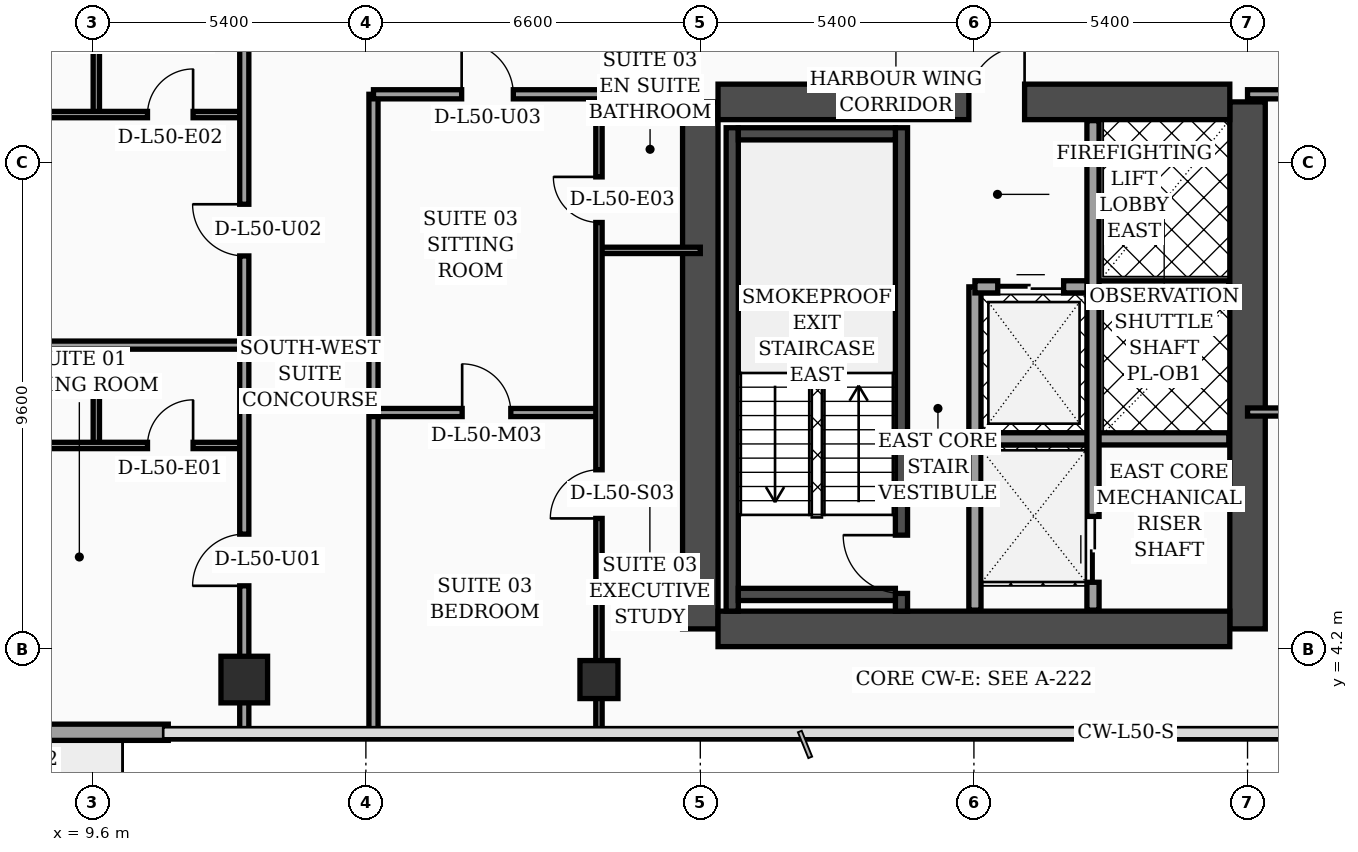
"""IFC4 building model, lengths in metres.
Left out: names, types, materials, properties, quantities, classifications, styles, units other than length and angle.
Written with IfcOpenShell. Run it as: python <this file> out.ifc"""

import sys

from ifc_helpers import new_model, si_unit, direction, frame, frame_2d, origin, origin_2d, place, context, subcontext, project, spatial, rectangle, hollow_rectangle, extrude, element, fill, save


model = new_model("IFC4")
c1 = context("Model", 3, precision=1e-05, world=origin(), true_north=direction((0.0, 1.0)))
c2 = subcontext(c1, "Body", "Model", "MODEL_VIEW")
j1 = project(units=[si_unit("LENGTHUNIT", "METRE"), si_unit("PLANEANGLEUNIT", "RADIAN")], contexts=[c1])
p1 = place(None, origin())
s1 = spatial("IfcSite", under=j1, at=p1, CompositionType="ELEMENT")
p2 = place(p1, origin())
s2 = spatial("IfcBuilding", under=s1, at=p2, CompositionType="ELEMENT")
p3 = place(p2, frame((0.0, 0.0, 203.4)))
s3 = spatial("IfcBuildingStorey", under=s2, at=p3, CompositionType="ELEMENT", Elevation=203.4)
for number, where, z_axis, x_axis in (
    (1, (21.6, 4.6, 0.0), (0.0, 0.0, 1.0), (0.0, 1.0, 0.0)),
    (2, (32.4, 4.6, 0.0), (0.0, 0.0, 1.0), (0.0, 1.0, 0.0)),
):
    element("IfcWall", number, at=place(p3, frame(where, z_axis=z_axis, x_axis=x_axis)), inside=s3, PredefinedType="SHEAR", context=c2, shape_type="SweptSolid", body=[
        extrude(rectangle(XDim=10.4, YDim=0.7, at=frame_2d((5.2, 0.0))), origin(), (0.0, 0.0, 1.0), 3.56),
    ])
p4 = place(p3, frame((21.95, 15.0, 0.0), z_axis=(0.0, 0.0, 1.0), x_axis=(1.0, 0.0, 0.0)))
e3 = element("IfcWall", 3, at=p4, inside=s3, PredefinedType="SHEAR", context=c2, shape_type="SweptSolid", body=[
    extrude(rectangle(XDim=10.1, YDim=0.7, at=frame_2d((5.05, 0.0))), origin(), (0.0, 0.0, 1.0), 3.56),
])
p5 = place(p4, frame((4.95, 0.0, 0.0)))
e4 = element("IfcOpeningElement", 4, at=p5, cuts=e3, PredefinedType="OPENING", context=c2, shape_type="SweptSolid", body=[
    extrude(rectangle(XDim=1.1, YDim=2.2, at=frame_2d((0.55, 1.1))), frame((0.0, 0.36, 0.0), z_axis=(0.0, -1.0, 0.0), x_axis=(1.0, 0.0, 0.0)), (0.0, 0.0, 1.0), 0.72),
])
p6 = place(p3, frame((21.95, 4.6, 0.0), z_axis=(0.0, 0.0, 1.0), x_axis=(1.0, 0.0, 0.0)))
e5 = element("IfcWall", 5, at=p6, inside=s3, PredefinedType="SHEAR", context=c2, shape_type="SweptSolid", body=[
    extrude(rectangle(XDim=10.1, YDim=0.7, at=frame_2d((5.05, 0.0))), origin(), (0.0, 0.0, 1.0), 3.56),
])
p7 = place(p3, frame((22.23, 4.95, 0.0), z_axis=(0.0, 0.0, 1.0), x_axis=(0.0, 1.0, 0.0)))
e6 = element("IfcWall", 6, at=p7, inside=s3, PredefinedType="SOLIDWALL", context=c2, shape_type="SweptSolid", body=[
    extrude(rectangle(XDim=9.54, YDim=0.24, at=frame_2d((4.77, 0.0))), origin(), (0.0, 0.0, 1.0), 3.56),
])
p8 = place(p3, frame((25.57, 4.95, 0.0), z_axis=(0.0, 0.0, 1.0), x_axis=(0.0, 1.0, 0.0)))
e7 = element("IfcWall", 7, at=p8, inside=s3, PredefinedType="SOLIDWALL", context=c2, shape_type="SweptSolid", body=[
    extrude(rectangle(XDim=9.54, YDim=0.24, at=frame_2d((4.77, 0.0))), origin(), (0.0, 0.0, 1.0), 3.56),
])
p9 = place(p8, frame((0.35, 0.0, 0.0)))
e8 = element("IfcOpeningElement", 8, at=p9, cuts=e7, PredefinedType="OPENING", context=c2, shape_type="SweptSolid", body=[
    extrude(rectangle(XDim=1.15, YDim=2.2, at=frame_2d((0.575, 1.1))), frame((0.0, 0.13, 0.0), z_axis=(0.0, -1.0, 0.0), x_axis=(1.0, 0.0, 0.0)), (0.0, 0.0, 1.0), 0.26),
])
for number, where, z_axis, x_axis in (
    (9, (22.35, 5.28, 0.0), (0.0, 0.0, 1.0), (1.0, 0.0, 0.0)),
    (10, (22.35, 14.37, 0.0), (0.0, 0.0, 1.0), (1.0, 0.0, 0.0)),
):
    element("IfcWall", number, at=place(p3, frame(where, z_axis=z_axis, x_axis=x_axis)), inside=s3, PredefinedType="SOLIDWALL", context=c2, shape_type="SweptSolid", body=[
        extrude(rectangle(XDim=3.1, YDim=0.24, at=frame_2d((1.55, 0.0))), origin(), (0.0, 0.0, 1.0), 3.56),
    ])
p10 = place(p3, frame((12.6, 3.6, 0.0), z_axis=(0.0, 0.0, 1.0), x_axis=(1.0, 0.0, 0.0)))
e11 = element("IfcColumn", 11, at=p10, inside=s3, PredefinedType="COLUMN", context=c2, shape_type="SweptSolid", body=[
    extrude(rectangle(XDim=0.92, YDim=0.92, at=origin_2d()), origin(), (0.0, 0.0, 1.0), 3.56),
])
p11 = place(p3, frame((19.6, 3.6, 0.0), z_axis=(0.0, 0.0, 1.0), x_axis=(1.0, 0.0, 0.0)))
e12 = element("IfcColumn", 12, at=p11, inside=s3, PredefinedType="COLUMN", context=c2, shape_type="SweptSolid", body=[
    extrude(hollow_rectangle(XDim=0.75, YDim=0.75, WallThickness=0.032, at=origin_2d()), origin(), (0.0, 0.0, 1.0), 3.56),
])
p12 = place(p3, frame((3.1, 2.56, 0.0), z_axis=(0.0, 0.0, 1.0), x_axis=(1.0, 0.0, 0.0)))
e13 = element("IfcWall", 13, at=p12, inside=s3, PredefinedType="SOLIDWALL", context=c2, shape_type="SweptSolid", body=[
    extrude(rectangle(XDim=8.0, YDim=0.32, at=frame_2d((4.0, 0.0))), origin(), (0.0, 0.0, 1.0), 3.56),
])
p13 = place(p12, frame((0.45, 0.0, 0.75)))
e14 = element("IfcOpeningElement", 14, at=p13, cuts=e13, PredefinedType="OPENING", context=c2, shape_type="SweptSolid", body=[
    extrude(rectangle(XDim=1.0, YDim=1.6, at=frame_2d((0.5, 0.8))), frame((0.0, 0.17, 0.0), z_axis=(0.0, -1.0, 0.0), x_axis=(1.0, 0.0, 0.0)), (0.0, 0.0, 1.0), 0.34),
])
p14 = place(p12, frame((4.2, 0.0, 0.0)))
e15 = element("IfcOpeningElement", 15, at=p14, cuts=e13, PredefinedType="OPENING", context=c2, shape_type="SweptSolid", body=[
    extrude(rectangle(XDim=1.4, YDim=2.25, at=frame_2d((0.7, 1.125))), frame((0.0, 0.17, 0.0), z_axis=(0.0, -1.0, 0.0), x_axis=(1.0, 0.0, 0.0)), (0.0, 0.0, 1.0), 0.34),
])
p15 = place(p3, frame((27.02, 4.97, 0.0), z_axis=(0.0, 0.0, 1.0), x_axis=(0.0, 1.0, 0.0)))
e16 = element("IfcWall", 16, at=p15, inside=s3, PredefinedType="SOLIDWALL", context=c2, shape_type="SweptSolid", body=[
    extrude(rectangle(XDim=6.38, YDim=0.24, at=frame_2d((3.19, 0.0))), origin(), (0.0, 0.0, 1.0), 3.56),
])
p16 = place(p3, frame((27.02, 11.35, 0.0), z_axis=(0.0, 0.0, 1.0), x_axis=(1.0, 0.0, 0.0)))
e17 = element("IfcWall", 17, at=p16, inside=s3, PredefinedType="SOLIDWALL", context=c2, shape_type="SweptSolid", body=[
    extrude(rectangle(XDim=5.01, YDim=0.24, at=frame_2d((2.505, 0.0))), origin(), (0.0, 0.0, 1.0), 3.56),
])
p17 = place(p16, frame((0.45, 0.0, 0.0)))
e18 = element("IfcOpeningElement", 18, at=p17, cuts=e17, PredefinedType="OPENING", context=c2, shape_type="SweptSolid", body=[
    extrude(rectangle(XDim=1.3, YDim=2.35, at=frame_2d((0.65, 1.175))), frame((0.0, 0.13, 0.0), z_axis=(0.0, -1.0, 0.0), x_axis=(1.0, 0.0, 0.0)), (0.0, 0.0, 1.0), 0.26),
])
p18 = place(p3, frame((27.02, 8.35, 0.0), z_axis=(0.0, 0.0, 1.0), x_axis=(1.0, 0.0, 0.0)))
e19 = element("IfcWall", 19, at=p18, inside=s3, PredefinedType="SOLIDWALL", context=c2, shape_type="SweptSolid", body=[
    extrude(rectangle(XDim=5.01, YDim=0.24, at=frame_2d((2.505, 0.0))), origin(), (0.0, 0.0, 1.0), 3.56),
])
p19 = place(p3, frame((29.35, 4.97, 0.0), z_axis=(0.0, 0.0, 1.0), x_axis=(0.0, 1.0, 0.0)))
e20 = element("IfcWall", 20, at=p19, inside=s3, PredefinedType="SOLIDWALL", context=c2, shape_type="SweptSolid", body=[
    extrude(rectangle(XDim=9.66, YDim=0.24, at=frame_2d((4.83, 0.0))), origin(), (0.0, 0.0, 1.0), 3.56),
])
p20 = place(p19, frame((0.55, 0.0, 0.0)))
e21 = element("IfcOpeningElement", 21, at=p20, cuts=e20, PredefinedType="OPENING", context=c2, shape_type="SweptSolid", body=[
    extrude(rectangle(XDim=1.3, YDim=2.35, at=frame_2d((0.65, 1.175))), frame((0.0, 0.13, 0.0), z_axis=(0.0, -1.0, 0.0), x_axis=(1.0, 0.0, 0.0)), (0.0, 0.0, 1.0), 0.26),
])
p21 = place(p3, frame((9.68, 8.22, 0.0), z_axis=(0.0, 0.0, 1.0), x_axis=(0.0, 1.0, 0.0)))
e22 = element("IfcWall", 22, at=p21, inside=s3, PredefinedType="PARTITIONING", context=c2, shape_type="SweptSolid", body=[
    extrude(rectangle(XDim=1.98, YDim=0.125, at=frame_2d((0.99, 0.0))), origin(), (0.0, 0.0, 1.0), 3.09),
])
p22 = place(p3, frame((3.2, 8.22, 0.0), z_axis=(0.0, 0.0, 1.0), x_axis=(1.0, 0.0, 0.0)))
e23 = element("IfcWall", 23, at=p22, inside=s3, PredefinedType="PARTITIONING", context=c2, shape_type="SweptSolid", body=[
    extrude(rectangle(XDim=9.4, YDim=0.125, at=frame_2d((4.7, 0.0))), origin(), (0.0, 0.0, 1.0), 2.94),
])
p23 = place(p22, frame((3.3, 0.0, 0.0)))
e24 = element("IfcOpeningElement", 24, at=p23, cuts=e23, PredefinedType="OPENING", context=c2, shape_type="SweptSolid", body=[
    extrude(rectangle(XDim=0.96, YDim=2.2, at=frame_2d((0.48, 1.1))), frame((0.0, 0.073, 0.0), z_axis=(0.0, -1.0, 0.0), x_axis=(1.0, 0.0, 0.0)), (0.0, 0.0, 1.0), 0.145),
])
p24 = place(p22, frame((7.49, 0.0, 0.0)))
e25 = element("IfcOpeningElement", 25, at=p24, cuts=e23, PredefinedType="OPENING", context=c2, shape_type="SweptSolid", body=[
    extrude(rectangle(XDim=0.9, YDim=2.15, at=frame_2d((0.45, 1.075))), frame((0.0, 0.073, 0.0), z_axis=(0.0, -1.0, 0.0), x_axis=(1.0, 0.0, 0.0)), (0.0, 0.0, 1.0), 0.145),
])
p25 = place(p3, frame((9.68, 14.75, 0.0), z_axis=(0.0, 0.0, 1.0), x_axis=(0.0, 1.0, 0.0)))
e26 = element("IfcWall", 26, at=p25, inside=s3, PredefinedType="PARTITIONING", context=c2, shape_type="SweptSolid", body=[
    extrude(rectangle(XDim=2.05, YDim=0.125, at=frame_2d((1.025, 0.0))), origin(), (0.0, 0.0, 1.0), 3.56),
])
p26 = place(p3, frame((0.08, 14.75, 0.0), z_axis=(0.0, 0.0, 1.0), x_axis=(1.0, 0.0, 0.0)))
e27 = element("IfcWall", 27, at=p26, inside=s3, PredefinedType="PARTITIONING", context=c2, shape_type="SweptSolid", body=[
    extrude(rectangle(XDim=12.52, YDim=0.125, at=frame_2d((6.26, 0.0))), origin(), (0.0, 0.0, 1.0), 2.94),
])
p27 = place(p26, frame((4.32, 0.0, 0.0)))
e28 = element("IfcOpeningElement", 28, at=p27, cuts=e27, PredefinedType="OPENING", context=c2, shape_type="SweptSolid", body=[
    extrude(rectangle(XDim=0.96, YDim=2.2, at=frame_2d((0.48, 1.1))), frame((0.0, 0.073, 0.0), z_axis=(0.0, -1.0, 0.0), x_axis=(1.0, 0.0, 0.0)), (0.0, 0.0, 1.0), 0.145),
])
p28 = place(p26, frame((10.61, 0.0, 0.0)))
e29 = element("IfcOpeningElement", 29, at=p28, cuts=e27, PredefinedType="OPENING", context=c2, shape_type="SweptSolid", body=[
    extrude(rectangle(XDim=0.9, YDim=2.15, at=frame_2d((0.45, 1.075))), frame((0.0, 0.073, 0.0), z_axis=(0.0, -1.0, 0.0), x_axis=(1.0, 0.0, 0.0)), (0.0, 0.0, 1.0), 0.145),
])
p29 = place(p3, frame((0.08, 10.2, 0.0), z_axis=(0.0, 0.0, 1.0), x_axis=(1.0, 0.0, 0.0)))
e30 = element("IfcWall", 30, at=p29, inside=s3, PredefinedType="PARTITIONING", context=c2, shape_type="SweptSolid", body=[
    extrude(rectangle(XDim=12.52, YDim=0.16, at=frame_2d((6.26, 0.0))), origin(), (0.0, 0.0, 1.0), 2.94),
])
p30 = place(p3, frame((12.6, 2.44, 0.0), z_axis=(0.0, 0.0, 1.0), x_axis=(0.0, 1.0, 0.0)))
e31 = element("IfcWall", 31, at=p30, inside=s3, PredefinedType="PARTITIONING", context=c2, shape_type="SweptSolid", body=[
    extrude(rectangle(XDim=14.36, YDim=0.18, at=frame_2d((7.18, 0.0))), origin(), (0.0, 0.0, 1.0), 2.94),
])
p31 = place(p30, frame((3.01, 0.0, 0.0)))
e32 = element("IfcOpeningElement", 32, at=p31, cuts=e31, PredefinedType="OPENING", context=c2, shape_type="SweptSolid", body=[
    extrude(rectangle(XDim=1.02, YDim=2.2, at=frame_2d((0.51, 1.1))), frame((0.0, 0.1, 0.0), z_axis=(0.0, -1.0, 0.0), x_axis=(1.0, 0.0, 0.0)), (0.0, 0.0, 1.0), 0.2),
])
p32 = place(p30, frame((9.52, 0.0, 0.0)))
e33 = element("IfcOpeningElement", 33, at=p32, cuts=e31, PredefinedType="OPENING", context=c2, shape_type="SweptSolid", body=[
    extrude(rectangle(XDim=1.02, YDim=2.2, at=frame_2d((0.51, 1.1))), frame((0.0, 0.1, 0.0), z_axis=(0.0, -1.0, 0.0), x_axis=(1.0, 0.0, 0.0)), (0.0, 0.0, 1.0), 0.2),
])
p33 = place(p3, frame((15.15, 2.44, 0.0), z_axis=(0.0, 0.0, 1.0), x_axis=(0.0, 1.0, 0.0)))
e34 = element("IfcWall", 34, at=p33, inside=s3, PredefinedType="PARTITIONING", context=c2, shape_type="SweptSolid", body=[
    extrude(rectangle(XDim=12.71, YDim=0.18, at=frame_2d((6.355, 0.0))), origin(), (0.0, 0.0, 1.0), 3.09),
])
p34 = place(p3, frame((19.6, 12.07, 0.0), z_axis=(0.0, 0.0, 1.0), x_axis=(1.0, 0.0, 0.0)))
e35 = element("IfcWall", 35, at=p34, inside=s3, PredefinedType="PARTITIONING", context=c2, shape_type="SweptSolid", body=[
    extrude(rectangle(XDim=2.0, YDim=0.125, at=frame_2d((1.0, 0.0))), origin(), (0.0, 0.0, 1.0), 3.56),
])
p35 = place(p3, frame((15.15, 8.87, 0.0), z_axis=(0.0, 0.0, 1.0), x_axis=(1.0, 0.0, 0.0)))
e36 = element("IfcWall", 36, at=p35, inside=s3, PredefinedType="PARTITIONING", context=c2, shape_type="SweptSolid", body=[
    extrude(rectangle(XDim=4.45, YDim=0.16, at=frame_2d((2.225, 0.0))), origin(), (0.0, 0.0, 1.0), 3.56),
])
p36 = place(p35, frame((1.75, 0.0, 0.0)))
e37 = element("IfcOpeningElement", 37, at=p36, cuts=e36, PredefinedType="OPENING", context=c2, shape_type="SweptSolid", body=[
    extrude(rectangle(XDim=0.96, YDim=2.2, at=frame_2d((0.48, 1.1))), frame((0.0, 0.09, 0.0), z_axis=(0.0, -1.0, 0.0), x_axis=(1.0, 0.0, 0.0)), (0.0, 0.0, 1.0), 0.18),
])
p37 = place(p3, frame((19.6, 2.44, 0.0), z_axis=(0.0, 0.0, 1.0), x_axis=(0.0, 1.0, 0.0)))
e38 = element("IfcWall", 38, at=p37, inside=s3, PredefinedType="PARTITIONING", context=c2, shape_type="SweptSolid", body=[
    extrude(rectangle(XDim=12.71, YDim=0.125, at=frame_2d((6.355, 0.0))), origin(), (0.0, 0.0, 1.0), 2.59),
])
p38 = place(p37, frame((4.34, 0.0, 0.0)))
e39 = element("IfcOpeningElement", 39, at=p38, cuts=e38, PredefinedType="OPENING", context=c2, shape_type="SweptSolid", body=[
    extrude(rectangle(XDim=0.96, YDim=2.2, at=frame_2d((0.48, 1.1))), frame((0.0, 0.073, 0.0), z_axis=(0.0, -1.0, 0.0), x_axis=(1.0, 0.0, 0.0)), (0.0, 0.0, 1.0), 0.145),
])
p39 = place(p37, frame((10.18, 0.0, 0.0)))
e40 = element("IfcOpeningElement", 40, at=p39, cuts=e38, PredefinedType="OPENING", context=c2, shape_type="SweptSolid", body=[
    extrude(rectangle(XDim=0.9, YDim=2.15, at=frame_2d((0.45, 1.075))), frame((0.0, 0.073, 0.0), z_axis=(0.0, -1.0, 0.0), x_axis=(1.0, 0.0, 0.0)), (0.0, 0.0, 1.0), 0.145),
])
p40 = place(p3, frame((15.15, 15.15, 0.0), z_axis=(0.0, 0.0, 1.0), x_axis=(1.0, 0.0, 0.0)))
e41 = element("IfcWall", 41, at=p40, inside=s3, PredefinedType="PARTITIONING", context=c2, shape_type="SweptSolid", body=[
    extrude(rectangle(XDim=6.45, YDim=0.18, at=frame_2d((3.225, 0.0))), origin(), (0.0, 0.0, 1.0), 2.59),
])
p41 = place(p40, frame((1.74, 0.0, 0.0)))
e42 = element("IfcOpeningElement", 42, at=p41, cuts=e41, PredefinedType="OPENING", context=c2, shape_type="SweptSolid", body=[
    extrude(rectangle(XDim=1.02, YDim=2.2, at=frame_2d((0.51, 1.1))), frame((0.0, 0.1, 0.0), z_axis=(0.0, -1.0, 0.0), x_axis=(1.0, 0.0, 0.0)), (0.0, 0.0, 1.0), 0.2),
])
p42 = place(p3, frame((32.4, 8.88, 0.0), z_axis=(0.0, 0.0, 1.0), x_axis=(1.0, 0.0, 0.0)))
e43 = element("IfcWall", 43, at=p42, inside=s3, PredefinedType="PARTITIONING", context=c2, shape_type="SweptSolid", body=[
    extrude(rectangle(XDim=7.02, YDim=0.16, at=frame_2d((3.51, 0.0))), origin(), (0.0, 0.0, 1.0), 2.94),
])
p43 = place(p42, frame((3.03, 0.0, 0.0)))
e44 = element("IfcOpeningElement", 44, at=p43, cuts=e43, PredefinedType="OPENING", context=c2, shape_type="SweptSolid", body=[
    extrude(rectangle(XDim=0.96, YDim=2.2, at=frame_2d((0.48, 1.1))), frame((0.0, 0.09, 0.0), z_axis=(0.0, -1.0, 0.0), x_axis=(1.0, 0.0, 0.0)), (0.0, 0.0, 1.0), 0.18),
])
p44 = place(p3, frame((32.4, 15.15, 0.0), z_axis=(0.0, 0.0, 1.0), x_axis=(1.0, 0.0, 0.0)))
e45 = element("IfcWall", 45, at=p44, inside=s3, PredefinedType="PARTITIONING", context=c2, shape_type="SweptSolid", body=[
    extrude(rectangle(XDim=9.15, YDim=0.18, at=frame_2d((4.575, 0.0))), origin(), (0.0, 0.0, 1.0), 2.94),
])
p45 = place(p44, frame((3.1, 0.0, 0.0)))
e46 = element("IfcOpeningElement", 46, at=p45, cuts=e45, PredefinedType="OPENING", context=c2, shape_type="SweptSolid", body=[
    extrude(rectangle(XDim=1.02, YDim=2.2, at=frame_2d((0.51, 1.1))), frame((0.0, 0.1, 0.0), z_axis=(0.0, -1.0, 0.0), x_axis=(1.0, 0.0, 0.0)), (0.0, 0.0, 1.0), 0.2),
])
p46 = place(p17, origin())
e47 = element("IfcDoor", 47, at=p46, inside=s3, OperationType="DOUBLE_DOOR_SLIDING", PredefinedType="DOOR", context=c2, shape_type="SweptSolid", body=[
    extrude(rectangle(XDim=1.3, YDim=2.35, at=frame_2d((0.65, 1.175))), frame((0.0, 0.025, 0.0), z_axis=(0.0, -1.0, 0.0), x_axis=(1.0, 0.0, 0.0)), (0.0, 0.0, 1.0), 0.05),
])
fill(e18, e47)
p47 = place(p20, origin())
e48 = element("IfcDoor", 48, at=p47, inside=s3, OperationType="DOUBLE_DOOR_SLIDING", PredefinedType="DOOR", context=c2, shape_type="SweptSolid", body=[
    extrude(rectangle(XDim=1.3, YDim=2.35, at=frame_2d((0.65, 1.175))), frame((0.0, 0.025, 0.0), z_axis=(0.0, -1.0, 0.0), x_axis=(1.0, 0.0, 0.0)), (0.0, 0.0, 1.0), 0.05),
])
fill(e21, e48)
p48 = place(p24, origin())
e49 = element("IfcDoor", 49, at=p48, inside=s3, OperationType="SINGLE_SWING_RIGHT", PredefinedType="DOOR", context=c2, shape_type="SweptSolid", body=[
    extrude(rectangle(XDim=0.9, YDim=2.15, at=frame_2d((0.45, 1.075))), frame((0.0, 0.025, 0.0), z_axis=(0.0, -1.0, 0.0), x_axis=(1.0, 0.0, 0.0)), (0.0, 0.0, 1.0), 0.05),
])
fill(e25, e49)
p49 = place(p28, origin())
e50 = element("IfcDoor", 50, at=p49, inside=s3, OperationType="SINGLE_SWING_RIGHT", PredefinedType="DOOR", context=c2, shape_type="SweptSolid", body=[
    extrude(rectangle(XDim=0.9, YDim=2.15, at=frame_2d((0.45, 1.075))), frame((0.0, 0.025, 0.0), z_axis=(0.0, -1.0, 0.0), x_axis=(1.0, 0.0, 0.0)), (0.0, 0.0, 1.0), 0.05),
])
fill(e29, e50)
p50 = place(p31, origin())
e51 = element("IfcDoor", 51, at=p50, inside=s3, OperationType="SINGLE_SWING_LEFT", PredefinedType="DOOR", context=c2, shape_type="SweptSolid", body=[
    extrude(rectangle(XDim=1.02, YDim=2.2, at=frame_2d((0.51, 1.1))), frame((0.0, 0.025, 0.0), z_axis=(0.0, -1.0, 0.0), x_axis=(1.0, 0.0, 0.0)), (0.0, 0.0, 1.0), 0.05),
])
fill(e32, e51)
p51 = place(p32, origin())
e52 = element("IfcDoor", 52, at=p51, inside=s3, OperationType="SINGLE_SWING_RIGHT", PredefinedType="DOOR", context=c2, shape_type="SweptSolid", body=[
    extrude(rectangle(XDim=1.02, YDim=2.2, at=frame_2d((0.51, 1.1))), frame((0.0, 0.025, 0.0), z_axis=(0.0, -1.0, 0.0), x_axis=(1.0, 0.0, 0.0)), (0.0, 0.0, 1.0), 0.05),
])
fill(e33, e52)
p52 = place(p36, origin())
e53 = element("IfcDoor", 53, at=p52, inside=s3, OperationType="SINGLE_SWING_LEFT", PredefinedType="DOOR", context=c2, shape_type="SweptSolid", body=[
    extrude(rectangle(XDim=0.96, YDim=2.2, at=frame_2d((0.48, 1.1))), frame((0.0, 0.025, 0.0), z_axis=(0.0, -1.0, 0.0), x_axis=(1.0, 0.0, 0.0)), (0.0, 0.0, 1.0), 0.05),
])
fill(e37, e53)
p53 = place(p38, origin())
e54 = element("IfcDoor", 54, at=p53, inside=s3, OperationType="SINGLE_SWING_LEFT", PredefinedType="DOOR", context=c2, shape_type="SweptSolid", body=[
    extrude(rectangle(XDim=0.96, YDim=2.2, at=frame_2d((0.48, 1.1))), frame((0.0, 0.025, 0.0), z_axis=(0.0, -1.0, 0.0), x_axis=(1.0, 0.0, 0.0)), (0.0, 0.0, 1.0), 0.05),
])
fill(e39, e54)
p54 = place(p39, origin())
e55 = element("IfcDoor", 55, at=p54, inside=s3, OperationType="SINGLE_SWING_RIGHT", PredefinedType="DOOR", context=c2, shape_type="SweptSolid", body=[
    extrude(rectangle(XDim=0.9, YDim=2.15, at=frame_2d((0.45, 1.075))), frame((0.0, 0.025, 0.0), z_axis=(0.0, -1.0, 0.0), x_axis=(1.0, 0.0, 0.0)), (0.0, 0.0, 1.0), 0.05),
])
fill(e40, e55)
p55 = place(p41, origin())
e56 = element("IfcDoor", 56, at=p55, inside=s3, OperationType="SINGLE_SWING_LEFT", PredefinedType="DOOR", context=c2, shape_type="SweptSolid", body=[
    extrude(rectangle(XDim=1.02, YDim=2.2, at=frame_2d((0.51, 1.1))), frame((0.0, 0.025, 0.0), z_axis=(0.0, -1.0, 0.0), x_axis=(1.0, 0.0, 0.0)), (0.0, 0.0, 1.0), 0.05),
])
fill(e42, e56)
p56 = place(p9, origin())
e57 = element("IfcDoor", 57, at=p56, inside=s3, OperationType="SINGLE_SWING_RIGHT", PredefinedType="DOOR", context=c2, shape_type="SweptSolid", body=[
    extrude(rectangle(XDim=1.15, YDim=2.2, at=frame_2d((0.575, 1.1))), frame((0.0, 0.025, 0.0), z_axis=(0.0, -1.0, 0.0), x_axis=(1.0, 0.0, 0.0)), (0.0, 0.0, 1.0), 0.05),
])
fill(e8, e57)
p57 = place(p5, origin())
e58 = element("IfcDoor", 58, at=p57, inside=s3, OperationType="SINGLE_SWING_RIGHT", PredefinedType="DOOR", context=c2, shape_type="SweptSolid", body=[
    extrude(rectangle(XDim=1.1, YDim=2.2, at=frame_2d((0.55, 1.1))), frame((0.0, 0.025, 0.0), z_axis=(0.0, -1.0, 0.0), x_axis=(1.0, 0.0, 0.0)), (0.0, 0.0, 1.0), 0.05),
])
fill(e4, e58)
save(model, sys.argv[1])
